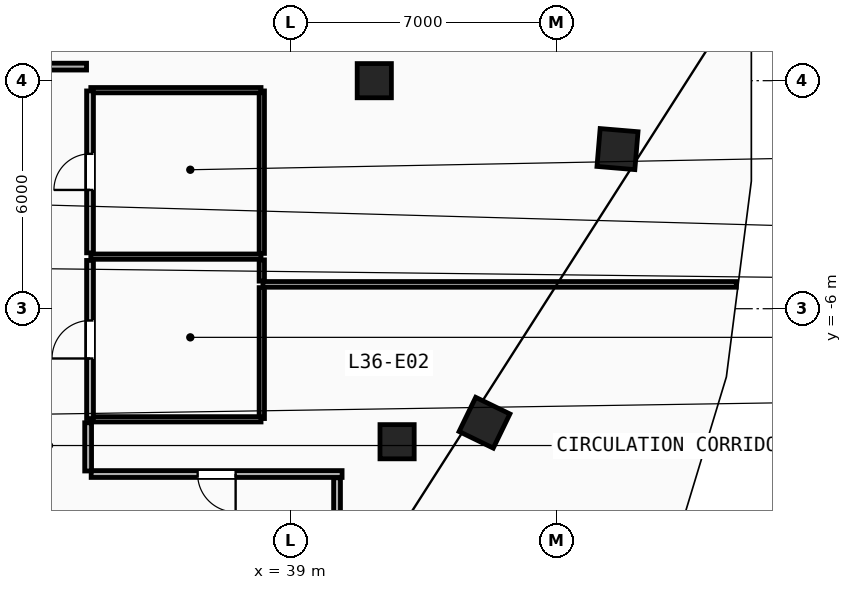
"""IFC4 building model, lengths in metres.
Left out: names, types, materials, properties, quantities, classifications, styles, units other than length and angle.
Written with IfcOpenShell. Run it as: python <this file> out.ifc"""

import sys

from ifc_helpers import new_model, si_unit, direction, frame, frame_2d, origin, origin_2d, place, context, subcontext, project, spatial, rectangle, extrude, element, fill, save


model = new_model("IFC4")
c1 = context("Model", 3, precision=1e-05, world=origin(), true_north=direction((0.0, 1.0)))
c2 = subcontext(c1, "Body", "Model", "MODEL_VIEW")
j1 = project(units=[si_unit("LENGTHUNIT", "METRE"), si_unit("PLANEANGLEUNIT", "RADIAN")], contexts=[c1])
p1 = place(None, origin())
s1 = spatial("IfcSite", under=j1, at=p1, CompositionType="ELEMENT")
p2 = place(p1, origin())
s2 = spatial("IfcBuilding", under=s1, at=p2, CompositionType="ELEMENT")
p3 = place(p2, frame((0.0, 0.0, 140.4)))
s3 = spatial("IfcBuildingStorey", under=s2, at=p3, CompositionType="ELEMENT", Elevation=140.4)
for number, where, z_axis, x_axis in (
    (1, (41.2, 0.0, 0.0), (0.0, 0.0, 1.0), (1.0, 0.0, 0.0)),
    (2, (41.8, -9.5, 0.0), (0.0, 0.0, 1.0), (1.0, 0.0, 0.0)),
):
    element("IfcColumn", number, at=place(p3, frame(where, z_axis=z_axis, x_axis=x_axis)), inside=s3, PredefinedType="COLUMN", context=c2, shape_type="SweptSolid", body=[
        extrude(rectangle(XDim=0.9, YDim=0.9, at=origin_2d()), origin(), (0.0, 0.0, 1.0), 3.6),
    ])
for number, where, z_axis, x_axis in (
    (3, (44.1, -9.0, 0.0), (0.0, 0.0, 1.0), (0.437, 0.899, 0.0)),
    (4, (47.6, -1.8, 0.0), (0.0, 0.0, 1.0), (0.084, 0.997, 0.0)),
):
    element("IfcColumn", number, at=place(p3, frame(where, z_axis=z_axis, x_axis=x_axis)), inside=s3, PredefinedType="COLUMN", context=c2, shape_type="SweptSolid", body=[
        extrude(rectangle(XDim=1.0, YDim=1.0, at=origin_2d()), origin(), (0.0, 0.0, 1.0), 3.6),
    ])
p4 = place(p3, frame((38.24, -8.89, 0.0), z_axis=(0.0, 0.0, 1.0), x_axis=(0.0, 1.0, 0.0)))
e5 = element("IfcWall", 5, at=p4, inside=s3, PredefinedType="PARTITIONING", context=c2, shape_type="SweptSolid", body=[
    extrude(rectangle(XDim=3.445, YDim=0.14, at=frame_2d((1.722, 0.0))), origin(), (0.0, 0.0, 1.0), 3.36),
])
p5 = place(p3, frame((38.24, -5.275, 0.0), z_axis=(0.0, 0.0, 1.0), x_axis=(0.0, 1.0, 0.0)))
e6 = element("IfcWall", 6, at=p5, inside=s3, PredefinedType="PARTITIONING", context=c2, shape_type="SweptSolid", body=[
    extrude(rectangle(XDim=0.56, YDim=0.14, at=frame_2d((0.28, 0.0))), origin(), (0.0, 0.0, 1.0), 3.36),
])
p6 = place(p3, frame((38.24, -4.545, 0.0), z_axis=(0.0, 0.0, 1.0), x_axis=(0.0, 1.0, 0.0)))
e7 = element("IfcWall", 7, at=p6, inside=s3, PredefinedType="PARTITIONING", context=c2, shape_type="SweptSolid", body=[
    extrude(rectangle(XDim=4.275, YDim=0.14, at=frame_2d((2.137, 0.0))), origin(), (0.0, 0.0, 1.0), 3.36),
])
for number, where, z_axis, x_axis in (
    (8, (33.74, -0.25, 0.0), (0.0, 0.0, 1.0), (1.0, 0.0, 0.0)),
    (9, (33.74, -4.63, 0.0), (0.0, 0.0, 1.0), (1.0, 0.0, 0.0)),
    (10, (33.74, -8.91, 0.0), (0.0, 0.0, 1.0), (1.0, 0.0, 0.0)),
):
    element("IfcWall", number, at=place(p3, frame(where, z_axis=z_axis, x_axis=x_axis)), inside=s3, PredefinedType="PARTITIONING", context=c2, shape_type="SweptSolid", body=[
        extrude(rectangle(XDim=4.48, YDim=0.14, at=frame_2d((2.24, 0.0))), origin(), (0.0, 0.0, 1.0), 3.36),
    ])
p7 = place(p3, frame((33.72, -4.53, 0.0), z_axis=(0.0, 0.0, 1.0), x_axis=(0.0, 1.0, 0.0)))
e11 = element("IfcWall", 11, at=p7, inside=s3, PredefinedType="PARTITIONING", context=c2, shape_type="SweptSolid", body=[
    extrude(rectangle(XDim=4.26, YDim=0.18, at=frame_2d((2.13, 0.0))), origin(), (0.0, 0.0, 1.0), 3.36),
])
p8 = place(p7, frame((1.655, 0.0, 0.0)))
e12 = element("IfcOpeningElement", 12, at=p8, cuts=e11, PredefinedType="OPENING", context=c2, shape_type="SweptSolid", body=[
    extrude(rectangle(XDim=0.95, YDim=2.1, at=frame_2d((0.475, 1.05))), frame((0.0, 0.1, 0.0), z_axis=(0.0, -1.0, 0.0), x_axis=(1.0, 0.0, 0.0)), (0.0, 0.0, 1.0), 0.2),
])
p9 = place(p3, frame((33.72, -8.89, 0.0), z_axis=(0.0, 0.0, 1.0), x_axis=(0.0, 1.0, 0.0)))
e13 = element("IfcWall", 13, at=p9, inside=s3, PredefinedType="PARTITIONING", context=c2, shape_type="SweptSolid", body=[
    extrude(rectangle(XDim=4.16, YDim=0.18, at=frame_2d((2.08, 0.0))), origin(), (0.0, 0.0, 1.0), 3.36),
])
p10 = place(p9, frame((1.58, 0.0, 0.0)))
e14 = element("IfcOpeningElement", 14, at=p10, cuts=e13, PredefinedType="OPENING", context=c2, shape_type="SweptSolid", body=[
    extrude(rectangle(XDim=1.0, YDim=2.15, at=frame_2d((0.5, 1.075))), frame((0.0, 0.1, 0.0), z_axis=(0.0, -1.0, 0.0), x_axis=(1.0, 0.0, 0.0)), (0.0, 0.0, 1.0), 0.2),
])
p11 = place(p3, frame((38.27, -5.36, 0.0), z_axis=(0.0, 0.0, 1.0), x_axis=(1.0, 0.0, 0.0)))
e15 = element("IfcWall", 15, at=p11, inside=s3, PredefinedType="PARTITIONING", context=c2, shape_type="SweptSolid", body=[
    extrude(rectangle(XDim=12.455, YDim=0.15, at=frame_2d((6.228, 0.0))), origin(), (0.0, 0.0, 1.0), 3.36),
])
p12 = place(p3, frame((40.22, -12.779, 0.0), z_axis=(0.0, 0.0, 1.0), x_axis=(0.0, 1.0, 0.0)))
e16 = element("IfcWall", 16, at=p12, inside=s3, PredefinedType="PARTITIONING", context=c2, shape_type="SweptSolid", body=[
    extrude(rectangle(XDim=2.329, YDim=0.18, at=frame_2d((1.164, 0.0))), origin(), (0.0, 0.0, 1.0), 3.36),
])
p13 = place(p3, frame((40.353, -10.35, 0.0), z_axis=(0.0, 0.0, 1.0), x_axis=(-1.0, 0.0, 0.0)))
e17 = element("IfcWall", 17, at=p13, inside=s3, PredefinedType="PARTITIONING", context=c2, shape_type="SweptSolid", body=[
    extrude(rectangle(XDim=6.603, YDim=0.18, at=frame_2d((3.301, 0.0))), origin(), (0.0, 0.0, 1.0), 3.36),
])
p14 = place(p13, frame((2.802, 0.0, 0.0)))
e18 = element("IfcOpeningElement", 18, at=p14, cuts=e17, PredefinedType="OPENING", context=c2, shape_type="SweptSolid", body=[
    extrude(rectangle(XDim=1.0, YDim=2.15, at=frame_2d((0.5, 1.075))), frame((0.0, 0.1, 0.0), z_axis=(0.0, -1.0, 0.0), x_axis=(1.0, 0.0, 0.0)), (0.0, 0.0, 1.0), 0.2),
])
p15 = place(p3, frame((33.67, -10.27, 0.0), z_axis=(0.0, 0.0, 1.0), x_axis=(0.0, 1.0, 0.0)))
e19 = element("IfcWall", 19, at=p15, inside=s3, PredefinedType="PARTITIONING", context=c2, shape_type="SweptSolid", body=[
    extrude(rectangle(XDim=1.269, YDim=0.18, at=frame_2d((0.634, 0.0))), origin(), (0.0, 0.0, 1.0), 3.36),
])
p16 = place(p3, frame((33.628, 0.37, 0.0), z_axis=(0.0, 0.0, 1.0), x_axis=(-1.0, 0.0, 0.0)))
e20 = element("IfcWall", 20, at=p16, inside=s3, PredefinedType="PARTITIONING", context=c2, shape_type="SweptSolid", body=[
    extrude(rectangle(XDim=5.628, YDim=0.18, at=frame_2d((2.814, 0.0))), origin(), (0.0, 0.0, 1.0), 3.36),
])
p17 = place(p14, origin())
e21 = element("IfcDoor", 21, at=p17, inside=s3, OperationType="SINGLE_SWING_LEFT", PredefinedType="DOOR", context=c2, shape_type="SweptSolid", body=[
    extrude(rectangle(XDim=1.0, YDim=2.15, at=frame_2d((0.5, 1.075))), frame((0.0, 0.025, 0.0), z_axis=(0.0, -1.0, 0.0), x_axis=(1.0, 0.0, 0.0)), (0.0, 0.0, 1.0), 0.05),
])
fill(e18, e21)
p18 = place(p8, origin())
e22 = element("IfcDoor", 22, at=p18, inside=s3, OperationType="SINGLE_SWING_LEFT", PredefinedType="DOOR", context=c2, shape_type="SweptSolid", body=[
    extrude(rectangle(XDim=0.95, YDim=2.1, at=frame_2d((0.475, 1.05))), frame((0.0, 0.025, 0.0), z_axis=(0.0, -1.0, 0.0), x_axis=(1.0, 0.0, 0.0)), (0.0, 0.0, 1.0), 0.05),
])
fill(e12, e22)
p19 = place(p10, origin())
e23 = element("IfcDoor", 23, at=p19, inside=s3, OperationType="SINGLE_SWING_LEFT", PredefinedType="DOOR", context=c2, shape_type="SweptSolid", body=[
    extrude(rectangle(XDim=1.0, YDim=2.15, at=frame_2d((0.5, 1.075))), frame((0.0, 0.025, 0.0), z_axis=(0.0, -1.0, 0.0), x_axis=(1.0, 0.0, 0.0)), (0.0, 0.0, 1.0), 0.05),
])
fill(e14, e23)
save(model, sys.argv[1])
